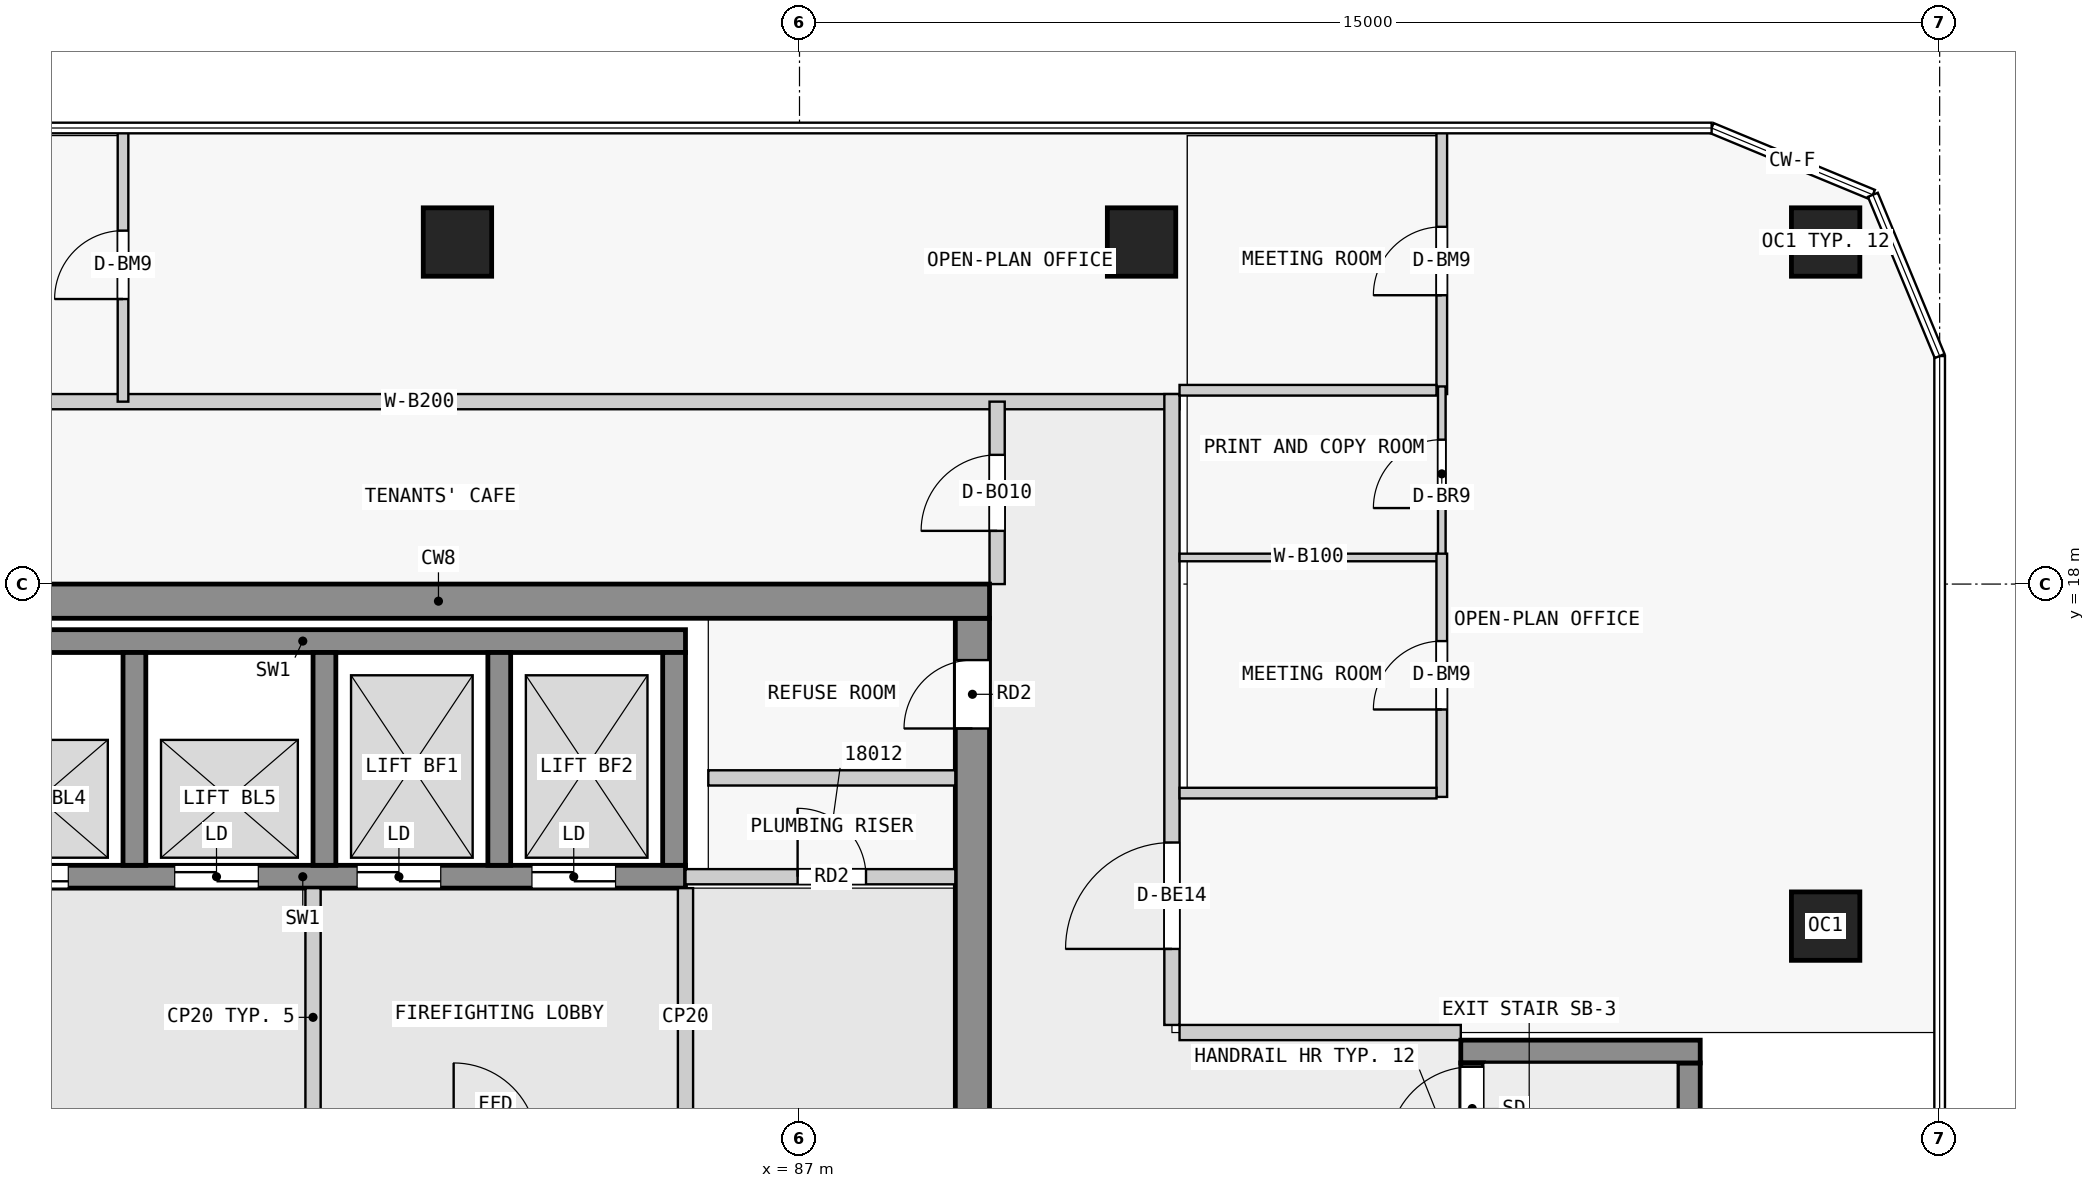
"""IFC4 building model, lengths in metres.
Left out: names, types, materials, properties, quantities, classifications, styles, units other than length and angle.
Written with IfcOpenShell. Run it as: python <this file> out.ifc"""

import sys

from ifc_helpers import new_model, si_unit, direction, frame, frame_2d, origin, origin_2d, place, context, subcontext, project, spatial, rectangle, extrude, element, fill, save


model = new_model("IFC4")
c1 = context("Model", 3, precision=1e-05, world=origin(), true_north=direction((0.0, 1.0)))
c2 = subcontext(c1, "Body", "Model", "MODEL_VIEW")
j1 = project(units=[si_unit("LENGTHUNIT", "METRE"), si_unit("PLANEANGLEUNIT", "RADIAN")], contexts=[c1])
p1 = place(None, origin())
s1 = spatial("IfcSite", under=j1, at=p1, CompositionType="ELEMENT")
p2 = place(p1, origin())
s2 = spatial("IfcBuilding", under=s1, at=p2, CompositionType="ELEMENT")
p3 = place(p2, frame((0.0, 0.0, 72.3)))
s3 = spatial("IfcBuildingStorey", under=s2, at=p3, CompositionType="ELEMENT", Elevation=72.3)
for number, where, z_axis, x_axis in (
    (1, (100.5, 13.5, 0.0), (0.0, 0.0, 1.0), (1.0, 0.0, 0.0)),
    (2, (100.5, 22.5, 0.0), (0.0, 0.0, 1.0), (1.0, 0.0, 0.0)),
    (3, (91.5, 22.5, 0.0), (0.0, 0.0, 1.0), (1.0, 0.0, 0.0)),
    (4, (82.5, 22.5, 0.0), (0.0, 0.0, 1.0), (1.0, 0.0, 0.0)),
):
    element("IfcColumn", number, at=place(p3, frame(where, z_axis=z_axis, x_axis=x_axis)), inside=s3, PredefinedType="COLUMN", context=c2, shape_type="SweptSolid", body=[
        extrude(rectangle(XDim=0.9, YDim=0.9, at=origin_2d()), origin(), (0.0, 0.0, 1.0), 6.0),
    ])
p4 = place(p3, frame((75.0, 17.775, 0.0), z_axis=(0.0, 0.0, 1.0), x_axis=(1.0, 0.0, 0.0)))
e5 = element("IfcWall", 5, at=p4, inside=s3, PredefinedType="SHEAR", context=c2, shape_type="SweptSolid", body=[
    extrude(rectangle(XDim=14.5, YDim=0.45, at=frame_2d((7.25, 0.0))), origin(), (0.0, 0.0, 1.0), 5.75),
])
p5 = place(p3, frame((89.275, 0.45, 0.0), z_axis=(0.0, 0.0, 1.0), x_axis=(0.0, 1.0, 0.0)))
e6 = element("IfcWall", 6, at=p5, inside=s3, PredefinedType="SHEAR", context=c2, shape_type="SweptSolid", body=[
    extrude(rectangle(XDim=17.1, YDim=0.45, at=frame_2d((8.55, 0.0))), origin(), (0.0, 0.0, 1.0), 5.75),
])
p6 = place(p5, frame((7.65, 0.0, 0.0)))
e7 = element("IfcOpeningElement", 7, at=p6, cuts=e6, PredefinedType="OPENING", context=c2, shape_type="SweptSolid", body=[
    extrude(rectangle(XDim=1.8, YDim=2.1, at=frame_2d((0.9, 1.05))), frame((0.0, 0.235, 0.0), z_axis=(0.0, -1.0, 0.0), x_axis=(1.0, 0.0, 0.0)), (0.0, 0.0, 1.0), 0.47),
])
p7 = place(p5, frame((15.65, 0.0, 0.0)))
e8 = element("IfcOpeningElement", 8, at=p7, cuts=e6, PredefinedType="OPENING", context=c2, shape_type="SweptSolid", body=[
    extrude(rectangle(XDim=0.9, YDim=2.1, at=frame_2d((0.45, 1.05))), frame((0.0, 0.235, 0.0), z_axis=(0.0, -1.0, 0.0), x_axis=(1.0, 0.0, 0.0)), (0.0, 0.0, 1.0), 0.47),
])
p8 = place(p3, frame((75.43, 17.25, 0.0), z_axis=(0.0, 0.0, 1.0), x_axis=(1.0, 0.0, 0.0)))
e9 = element("IfcWall", 9, at=p8, inside=s3, PredefinedType="SHEAR", context=c2, shape_type="SweptSolid", body=[
    extrude(rectangle(XDim=10.07, YDim=0.3, at=frame_2d((5.035, 0.0))), origin(), (0.0, 0.0, 1.0), 5.75),
])
p9 = place(p3, frame((75.43, 14.15, 0.0), z_axis=(0.0, 0.0, 1.0), x_axis=(1.0, 0.0, 0.0)))
e10 = element("IfcWall", 10, at=p9, inside=s3, PredefinedType="SHEAR", context=c2, shape_type="SweptSolid", body=[
    extrude(rectangle(XDim=10.07, YDim=0.3, at=frame_2d((5.035, 0.0))), origin(), (0.0, 0.0, 1.0), 5.75),
])
p10 = place(p9, frame((0.85, 0.0, 0.0)))
e11 = element("IfcOpeningElement", 11, at=p10, cuts=e10, PredefinedType="OPENING", context=c2, shape_type="SweptSolid", body=[
    extrude(rectangle(XDim=1.1, YDim=2.1, at=frame_2d((0.55, 1.05))), frame((0.0, 0.16, 0.0), z_axis=(0.0, -1.0, 0.0), x_axis=(1.0, 0.0, 0.0)), (0.0, 0.0, 1.0), 0.32),
])
p11 = place(p9, frame((3.35, 0.0, 0.0)))
e12 = element("IfcOpeningElement", 12, at=p11, cuts=e10, PredefinedType="OPENING", context=c2, shape_type="SweptSolid", body=[
    extrude(rectangle(XDim=1.1, YDim=2.1, at=frame_2d((0.55, 1.05))), frame((0.0, 0.16, 0.0), z_axis=(0.0, -1.0, 0.0), x_axis=(1.0, 0.0, 0.0)), (0.0, 0.0, 1.0), 0.32),
])
p12 = place(p9, frame((5.75, 0.0, 0.0)))
e13 = element("IfcOpeningElement", 13, at=p12, cuts=e10, PredefinedType="OPENING", context=c2, shape_type="SweptSolid", body=[
    extrude(rectangle(XDim=1.1, YDim=2.1, at=frame_2d((0.55, 1.05))), frame((0.0, 0.16, 0.0), z_axis=(0.0, -1.0, 0.0), x_axis=(1.0, 0.0, 0.0)), (0.0, 0.0, 1.0), 0.32),
])
p13 = place(p9, frame((8.05, 0.0, 0.0)))
e14 = element("IfcOpeningElement", 14, at=p13, cuts=e10, PredefinedType="OPENING", context=c2, shape_type="SweptSolid", body=[
    extrude(rectangle(XDim=1.1, YDim=2.1, at=frame_2d((0.55, 1.05))), frame((0.0, 0.16, 0.0), z_axis=(0.0, -1.0, 0.0), x_axis=(1.0, 0.0, 0.0)), (0.0, 0.0, 1.0), 0.32),
])
for number, where, z_axis, x_axis in (
    (15, (78.25, 14.3, 0.0), (0.0, 0.0, 1.0), (0.0, 1.0, 0.0)),
    (16, (80.75, 14.3, 0.0), (0.0, 0.0, 1.0), (0.0, 1.0, 0.0)),
    (17, (83.05, 14.3, 0.0), (0.0, 0.0, 1.0), (0.0, 1.0, 0.0)),
    (18, (85.35, 14.3, 0.0), (0.0, 0.0, 1.0), (0.0, 1.0, 0.0)),
):
    element("IfcWall", number, at=place(p3, frame(where, z_axis=z_axis, x_axis=x_axis)), inside=s3, PredefinedType="SHEAR", context=c2, shape_type="SweptSolid", body=[
        extrude(rectangle(XDim=2.8, YDim=0.3, at=frame_2d((1.4, 0.0))), origin(), (0.0, 0.0, 1.0), 5.75),
    ])
p14 = place(p3, frame((95.85, 5.3, 0.0), z_axis=(0.0, 0.0, 1.0), x_axis=(0.0, 1.0, 0.0)))
e19 = element("IfcWall", 19, at=p14, inside=s3, PredefinedType="SHEAR", context=c2, shape_type="SweptSolid", body=[
    extrude(rectangle(XDim=6.4, YDim=0.3, at=frame_2d((3.2, 0.0))), origin(), (0.0, 0.0, 1.0), 5.75),
])
p15 = place(p14, frame((5.25, 0.0, 0.0)))
e20 = element("IfcOpeningElement", 20, at=p15, cuts=e19, PredefinedType="OPENING", context=c2, shape_type="SweptSolid", body=[
    extrude(rectangle(XDim=1.1, YDim=2.1, at=frame_2d((0.55, 1.05))), frame((0.0, 0.16, 0.0), z_axis=(0.0, -1.0, 0.0), x_axis=(1.0, 0.0, 0.0)), (0.0, 0.0, 1.0), 0.32),
])
p16 = place(p3, frame((98.7, 5.3, 0.0), z_axis=(0.0, 0.0, 1.0), x_axis=(0.0, 1.0, 0.0)))
e21 = element("IfcWall", 21, at=p16, inside=s3, PredefinedType="SHEAR", context=c2, shape_type="SweptSolid", body=[
    extrude(rectangle(XDim=6.4, YDim=0.3, at=frame_2d((3.2, 0.0))), origin(), (0.0, 0.0, 1.0), 5.75),
])
p17 = place(p3, frame((95.7, 11.85, 0.0), z_axis=(0.0, 0.0, 1.0), x_axis=(1.0, 0.0, 0.0)))
e22 = element("IfcWall", 22, at=p17, inside=s3, PredefinedType="SHEAR", context=c2, shape_type="SweptSolid", body=[
    extrude(rectangle(XDim=3.15, YDim=0.3, at=frame_2d((1.575, 0.0))), origin(), (0.0, 0.0, 1.0), 5.75),
])
for number, where, z_axis, x_axis in (
    (23, (80.6, 10.6, 0.0), (0.0, 0.0, 1.0), (0.0, 1.0, 0.0)),
    (24, (85.5, 10.6, 0.0), (0.0, 0.0, 1.0), (0.0, 1.0, 0.0)),
):
    element("IfcWall", number, at=place(p3, frame(where, z_axis=z_axis, x_axis=x_axis)), inside=s3, PredefinedType="PARTITIONING", context=c2, shape_type="SweptSolid", body=[
        extrude(rectangle(XDim=3.4, YDim=0.2, at=frame_2d((1.7, 0.0))), origin(), (0.0, 0.0, 1.0), 5.75),
    ])
p18 = place(p3, frame((85.5, 14.15, 0.0), z_axis=(0.0, 0.0, 1.0), x_axis=(1.0, 0.0, 0.0)))
e25 = element("IfcWall", 25, at=p18, inside=s3, PredefinedType="PARTITIONING", context=c2, shape_type="SweptSolid", body=[
    extrude(rectangle(XDim=3.55, YDim=0.2, at=frame_2d((1.775, 0.0))), origin(), (0.0, 0.0, 1.0), 5.75),
])
p19 = place(p18, frame((1.475, 0.0, 0.0)))
e26 = element("IfcOpeningElement", 26, at=p19, cuts=e25, PredefinedType="OPENING", context=c2, shape_type="SweptSolid", body=[
    extrude(rectangle(XDim=0.9, YDim=2.1, at=frame_2d((0.45, 1.05))), frame((0.0, 0.11, 0.0), z_axis=(0.0, -1.0, 0.0), x_axis=(1.0, 0.0, 0.0)), (0.0, 0.0, 1.0), 0.22),
])
p20 = place(p3, frame((85.8, 15.45, 0.0), z_axis=(0.0, 0.0, 1.0), x_axis=(1.0, 0.0, 0.0)))
e27 = element("IfcWall", 27, at=p20, inside=s3, PredefinedType="PARTITIONING", context=c2, shape_type="SweptSolid", body=[
    extrude(rectangle(XDim=3.25, YDim=0.2, at=frame_2d((1.625, 0.0))), origin(), (0.0, 0.0, 1.0), 5.75),
])
p21 = place(p3, frame((72.0, 20.4, 0.0), z_axis=(0.0, 0.0, 1.0), x_axis=(1.0, 0.0, 0.0)))
e28 = element("IfcWall", 28, at=p21, inside=s3, PredefinedType="PARTITIONING", context=c2, shape_type="SweptSolid", body=[
    extrude(rectangle(XDim=20.0, YDim=0.2, at=frame_2d((10.0, 0.0))), origin(), (0.0, 0.0, 1.0), 5.75),
])
p22 = place(p3, frame((91.9, 12.2, 0.0), z_axis=(0.0, 0.0, 1.0), x_axis=(0.0, 1.0, 0.0)))
e29 = element("IfcWall", 29, at=p22, inside=s3, PredefinedType="PARTITIONING", context=c2, shape_type="SweptSolid", body=[
    extrude(rectangle(XDim=8.3, YDim=0.2, at=frame_2d((4.15, 0.0))), origin(), (0.0, 0.0, 1.0), 5.75),
])
p23 = place(p22, frame((1.0, 0.0, 0.0)))
e30 = element("IfcOpeningElement", 30, at=p23, cuts=e29, PredefinedType="OPENING", context=c2, shape_type="SweptSolid", body=[
    extrude(rectangle(XDim=1.4, YDim=2.4, at=frame_2d((0.7, 1.2))), frame((0.0, 0.11, 0.0), z_axis=(0.0, -1.0, 0.0), x_axis=(1.0, 0.0, 0.0)), (0.0, 0.0, 1.0), 0.22),
])
p24 = place(p3, frame((92.0, 12.1, 0.0), z_axis=(0.0, 0.0, 1.0), x_axis=(1.0, 0.0, 0.0)))
e31 = element("IfcWall", 31, at=p24, inside=s3, PredefinedType="PARTITIONING", context=c2, shape_type="SweptSolid", body=[
    extrude(rectangle(XDim=3.7, YDim=0.2, at=frame_2d((1.85, 0.0))), origin(), (0.0, 0.0, 1.0), 5.75),
])
p25 = place(p3, frame((89.6, 18.0, 0.0), z_axis=(0.0, 0.0, 1.0), x_axis=(0.0, 1.0, 0.0)))
e32 = element("IfcWall", 32, at=p25, inside=s3, PredefinedType="PARTITIONING", context=c2, shape_type="SweptSolid", body=[
    extrude(rectangle(XDim=2.4, YDim=0.2, at=frame_2d((1.2, 0.0))), origin(), (0.0, 0.0, 1.0), 5.75),
])
p26 = place(p25, frame((0.7, 0.0, 0.0)))
e33 = element("IfcOpeningElement", 33, at=p26, cuts=e32, PredefinedType="OPENING", context=c2, shape_type="SweptSolid", body=[
    extrude(rectangle(XDim=1.0, YDim=2.4, at=frame_2d((0.5, 1.2))), frame((0.0, 0.11, 0.0), z_axis=(0.0, -1.0, 0.0), x_axis=(1.0, 0.0, 0.0)), (0.0, 0.0, 1.0), 0.22),
])
p27 = place(p3, frame((95.45, 20.5, 0.0), z_axis=(0.0, 0.0, 1.0), x_axis=(0.0, 1.0, 0.0)))
e34 = element("IfcWall", 34, at=p27, inside=s3, PredefinedType="PARTITIONING", context=c2, shape_type="SweptSolid", body=[
    extrude(rectangle(XDim=3.5, YDim=0.14, at=frame_2d((1.75, 0.0))), origin(), (0.0, 0.0, 1.0), 5.75),
])
p28 = place(p27, frame((1.3, 0.0, 0.0)))
e35 = element("IfcOpeningElement", 35, at=p28, cuts=e34, PredefinedType="OPENING", context=c2, shape_type="SweptSolid", body=[
    extrude(rectangle(XDim=0.9, YDim=2.4, at=frame_2d((0.45, 1.2))), frame((0.0, 0.08, 0.0), z_axis=(0.0, -1.0, 0.0), x_axis=(1.0, 0.0, 0.0)), (0.0, 0.0, 1.0), 0.16),
])
p29 = place(p3, frame((92.0, 20.55, 0.0), z_axis=(0.0, 0.0, 1.0), x_axis=(1.0, 0.0, 0.0)))
e36 = element("IfcWall", 36, at=p29, inside=s3, PredefinedType="PARTITIONING", context=c2, shape_type="SweptSolid", body=[
    extrude(rectangle(XDim=3.38, YDim=0.14, at=frame_2d((1.69, 0.0))), origin(), (0.0, 0.0, 1.0), 5.75),
])
p30 = place(p3, frame((95.45, 18.3, 0.0), z_axis=(0.0, 0.0, 1.0), x_axis=(0.0, 1.0, 0.0)))
e37 = element("IfcWall", 37, at=p30, inside=s3, PredefinedType="PARTITIONING", context=c2, shape_type="SweptSolid", body=[
    extrude(rectangle(XDim=2.3, YDim=0.1, at=frame_2d((1.15, 0.0))), origin(), (0.0, 0.0, 1.0), 5.75),
])
p31 = place(p30, frame((0.7, 0.0, 0.0)))
e38 = element("IfcOpeningElement", 38, at=p31, cuts=e37, PredefinedType="OPENING", context=c2, shape_type="SweptSolid", body=[
    extrude(rectangle(XDim=0.9, YDim=2.1, at=frame_2d((0.45, 1.05))), frame((0.0, 0.06, 0.0), z_axis=(0.0, -1.0, 0.0), x_axis=(1.0, 0.0, 0.0)), (0.0, 0.0, 1.0), 0.12),
])
p32 = place(p3, frame((92.0, 18.35, 0.0), z_axis=(0.0, 0.0, 1.0), x_axis=(1.0, 0.0, 0.0)))
e39 = element("IfcWall", 39, at=p32, inside=s3, PredefinedType="PARTITIONING", context=c2, shape_type="SweptSolid", body=[
    extrude(rectangle(XDim=3.4, YDim=0.1, at=frame_2d((1.7, 0.0))), origin(), (0.0, 0.0, 1.0), 5.75),
])
p33 = place(p3, frame((95.45, 15.2, 0.0), z_axis=(0.0, 0.0, 1.0), x_axis=(0.0, 1.0, 0.0)))
e40 = element("IfcWall", 40, at=p33, inside=s3, PredefinedType="PARTITIONING", context=c2, shape_type="SweptSolid", body=[
    extrude(rectangle(XDim=3.2, YDim=0.14, at=frame_2d((1.6, 0.0))), origin(), (0.0, 0.0, 1.0), 5.75),
])
p34 = place(p33, frame((1.15, 0.0, 0.0)))
e41 = element("IfcOpeningElement", 41, at=p34, cuts=e40, PredefinedType="OPENING", context=c2, shape_type="SweptSolid", body=[
    extrude(rectangle(XDim=0.9, YDim=2.4, at=frame_2d((0.45, 1.2))), frame((0.0, 0.08, 0.0), z_axis=(0.0, -1.0, 0.0), x_axis=(1.0, 0.0, 0.0)), (0.0, 0.0, 1.0), 0.16),
])
p35 = place(p3, frame((92.0, 15.25, 0.0), z_axis=(0.0, 0.0, 1.0), x_axis=(1.0, 0.0, 0.0)))
e42 = element("IfcWall", 42, at=p35, inside=s3, PredefinedType="PARTITIONING", context=c2, shape_type="SweptSolid", body=[
    extrude(rectangle(XDim=3.38, YDim=0.14, at=frame_2d((1.69, 0.0))), origin(), (0.0, 0.0, 1.0), 5.75),
])
p36 = place(p3, frame((78.1, 20.4, 0.0), z_axis=(0.0, 0.0, 1.0), x_axis=(0.0, 1.0, 0.0)))
e43 = element("IfcWall", 43, at=p36, inside=s3, PredefinedType="PARTITIONING", context=c2, shape_type="SweptSolid", body=[
    extrude(rectangle(XDim=3.6, YDim=0.14, at=frame_2d((1.8, 0.0))), origin(), (0.0, 0.0, 1.0), 5.75),
])
p37 = place(p36, frame((1.35, 0.0, 0.0)))
e44 = element("IfcOpeningElement", 44, at=p37, cuts=e43, PredefinedType="OPENING", context=c2, shape_type="SweptSolid", body=[
    extrude(rectangle(XDim=0.9, YDim=2.4, at=frame_2d((0.45, 1.2))), frame((0.0, 0.08, 0.0), z_axis=(0.0, -1.0, 0.0), x_axis=(1.0, 0.0, 0.0)), (0.0, 0.0, 1.0), 0.16),
])
p38 = place(p10, origin())
e45 = element("IfcDoor", 45, at=p38, inside=s3, OperationType="DOUBLE_DOOR_SLIDING", PredefinedType="DOOR", context=c2, shape_type="SweptSolid", body=[
    extrude(rectangle(XDim=1.1, YDim=2.1, at=frame_2d((0.55, 1.05))), frame((0.0, 0.025, 0.0), z_axis=(0.0, -1.0, 0.0), x_axis=(1.0, 0.0, 0.0)), (0.0, 0.0, 1.0), 0.05),
])
fill(e11, e45)
p39 = place(p11, origin())
e46 = element("IfcDoor", 46, at=p39, inside=s3, OperationType="DOUBLE_DOOR_SLIDING", PredefinedType="DOOR", context=c2, shape_type="SweptSolid", body=[
    extrude(rectangle(XDim=1.1, YDim=2.1, at=frame_2d((0.55, 1.05))), frame((0.0, 0.025, 0.0), z_axis=(0.0, -1.0, 0.0), x_axis=(1.0, 0.0, 0.0)), (0.0, 0.0, 1.0), 0.05),
])
fill(e12, e46)
p40 = place(p12, origin())
e47 = element("IfcDoor", 47, at=p40, inside=s3, OperationType="DOUBLE_DOOR_SLIDING", PredefinedType="DOOR", context=c2, shape_type="SweptSolid", body=[
    extrude(rectangle(XDim=1.1, YDim=2.1, at=frame_2d((0.55, 1.05))), frame((0.0, 0.025, 0.0), z_axis=(0.0, -1.0, 0.0), x_axis=(1.0, 0.0, 0.0)), (0.0, 0.0, 1.0), 0.05),
])
fill(e13, e47)
p41 = place(p13, origin())
e48 = element("IfcDoor", 48, at=p41, inside=s3, OperationType="DOUBLE_DOOR_SLIDING", PredefinedType="DOOR", context=c2, shape_type="SweptSolid", body=[
    extrude(rectangle(XDim=1.1, YDim=2.1, at=frame_2d((0.55, 1.05))), frame((0.0, 0.025, 0.0), z_axis=(0.0, -1.0, 0.0), x_axis=(1.0, 0.0, 0.0)), (0.0, 0.0, 1.0), 0.05),
])
fill(e14, e48)
p42 = place(p15, origin())
e49 = element("IfcDoor", 49, at=p42, inside=s3, OperationType="SINGLE_SWING_LEFT", PredefinedType="DOOR", context=c2, shape_type="SweptSolid", body=[
    extrude(rectangle(XDim=1.1, YDim=2.1, at=frame_2d((0.55, 1.05))), frame((0.0, 0.025, 0.0), z_axis=(0.0, -1.0, 0.0), x_axis=(1.0, 0.0, 0.0)), (0.0, 0.0, 1.0), 0.05),
])
fill(e20, e49)
p43 = place(p19, origin())
e50 = element("IfcDoor", 50, at=p43, inside=s3, OperationType="SINGLE_SWING_LEFT", PredefinedType="DOOR", context=c2, shape_type="SweptSolid", body=[
    extrude(rectangle(XDim=0.9, YDim=2.1, at=frame_2d((0.45, 1.05))), frame((0.0, 0.025, 0.0), z_axis=(0.0, -1.0, 0.0), x_axis=(1.0, 0.0, 0.0)), (0.0, 0.0, 1.0), 0.05),
])
fill(e26, e50)
p44 = place(p7, origin())
e51 = element("IfcDoor", 51, at=p44, inside=s3, OperationType="SINGLE_SWING_LEFT", PredefinedType="DOOR", context=c2, shape_type="SweptSolid", body=[
    extrude(rectangle(XDim=0.9, YDim=2.1, at=frame_2d((0.45, 1.05))), frame((0.0, 0.025, 0.0), z_axis=(0.0, -1.0, 0.0), x_axis=(1.0, 0.0, 0.0)), (0.0, 0.0, 1.0), 0.05),
])
fill(e8, e51)
p45 = place(p26, origin())
e52 = element("IfcDoor", 52, at=p45, inside=s3, OperationType="SINGLE_SWING_LEFT", PredefinedType="DOOR", context=c2, shape_type="SweptSolid", body=[
    extrude(rectangle(XDim=1.0, YDim=2.4, at=frame_2d((0.5, 1.2))), frame((0.0, 0.025, 0.0), z_axis=(0.0, -1.0, 0.0), x_axis=(1.0, 0.0, 0.0)), (0.0, 0.0, 1.0), 0.05),
])
fill(e33, e52)
p46 = place(p23, origin())
e53 = element("IfcDoor", 53, at=p46, inside=s3, OperationType="DOUBLE_DOOR_SINGLE_SWING", PredefinedType="DOOR", context=c2, shape_type="SweptSolid", body=[
    extrude(rectangle(XDim=1.4, YDim=2.4, at=frame_2d((0.7, 1.2))), frame((0.0, 0.025, 0.0), z_axis=(0.0, -1.0, 0.0), x_axis=(1.0, 0.0, 0.0)), (0.0, 0.0, 1.0), 0.05),
])
fill(e30, e53)
p47 = place(p28, origin())
e54 = element("IfcDoor", 54, at=p47, inside=s3, OperationType="SINGLE_SWING_LEFT", PredefinedType="DOOR", context=c2, shape_type="SweptSolid", body=[
    extrude(rectangle(XDim=0.9, YDim=2.4, at=frame_2d((0.45, 1.2))), frame((0.0, 0.025, 0.0), z_axis=(0.0, -1.0, 0.0), x_axis=(1.0, 0.0, 0.0)), (0.0, 0.0, 1.0), 0.05),
])
fill(e35, e54)
p48 = place(p31, origin())
e55 = element("IfcDoor", 55, at=p48, inside=s3, OperationType="SINGLE_SWING_LEFT", PredefinedType="DOOR", context=c2, shape_type="SweptSolid", body=[
    extrude(rectangle(XDim=0.9, YDim=2.1, at=frame_2d((0.45, 1.05))), frame((0.0, 0.025, 0.0), z_axis=(0.0, -1.0, 0.0), x_axis=(1.0, 0.0, 0.0)), (0.0, 0.0, 1.0), 0.05),
])
fill(e38, e55)
p49 = place(p34, origin())
e56 = element("IfcDoor", 56, at=p49, inside=s3, OperationType="SINGLE_SWING_LEFT", PredefinedType="DOOR", context=c2, shape_type="SweptSolid", body=[
    extrude(rectangle(XDim=0.9, YDim=2.4, at=frame_2d((0.45, 1.2))), frame((0.0, 0.025, 0.0), z_axis=(0.0, -1.0, 0.0), x_axis=(1.0, 0.0, 0.0)), (0.0, 0.0, 1.0), 0.05),
])
fill(e41, e56)
p50 = place(p37, origin())
e57 = element("IfcDoor", 57, at=p50, inside=s3, OperationType="SINGLE_SWING_LEFT", PredefinedType="DOOR", context=c2, shape_type="SweptSolid", body=[
    extrude(rectangle(XDim=0.9, YDim=2.4, at=frame_2d((0.45, 1.2))), frame((0.0, 0.025, 0.0), z_axis=(0.0, -1.0, 0.0), x_axis=(1.0, 0.0, 0.0)), (0.0, 0.0, 1.0), 0.05),
])
fill(e44, e57)
save(model, sys.argv[1])
